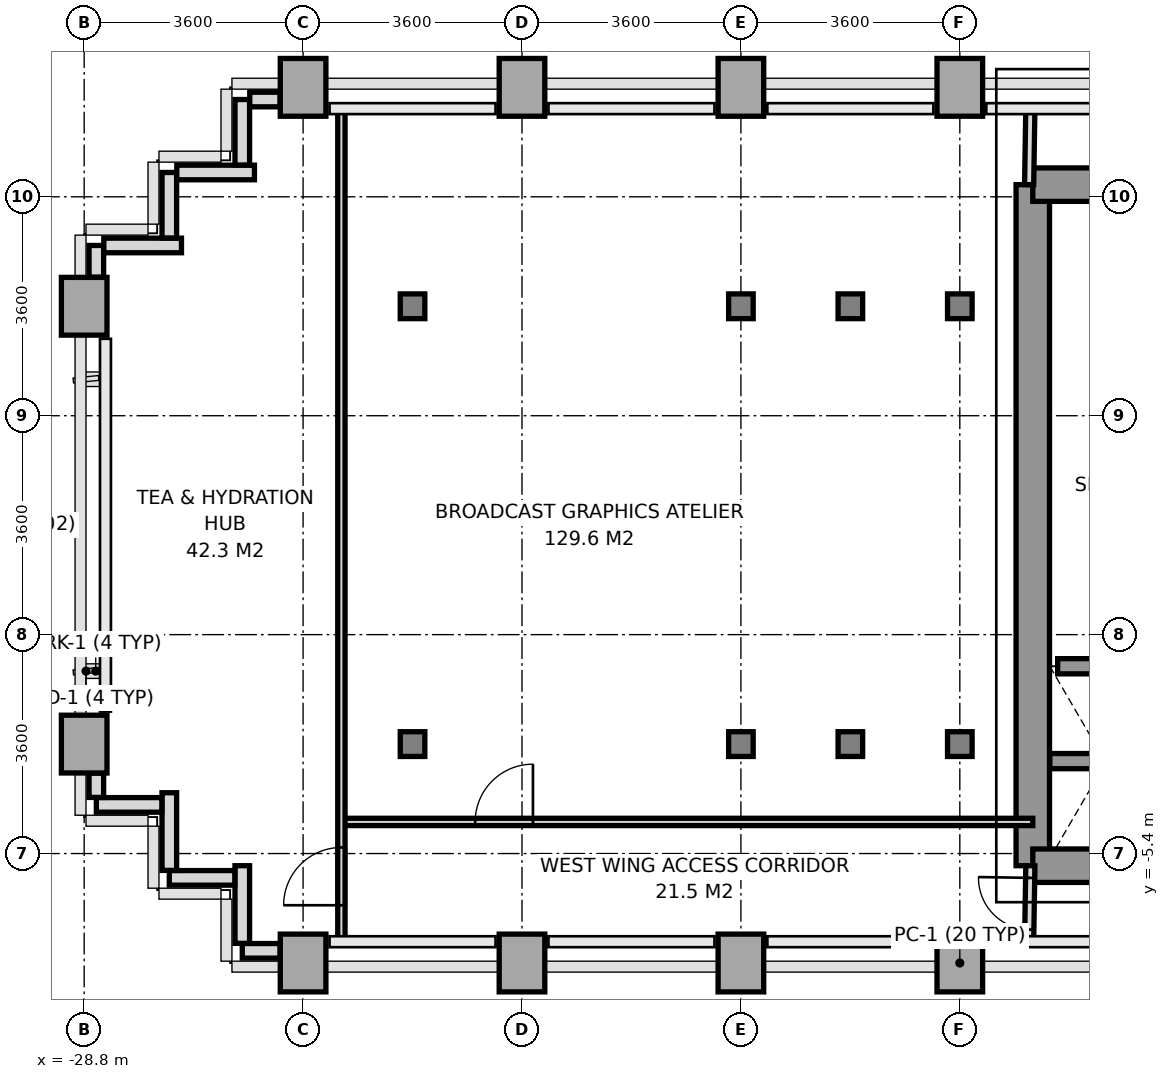
"""IFC4 building model, lengths in metres.
Left out: names, types, materials, properties, quantities, classifications, styles, units other than length and angle.
Written with IfcOpenShell. Run it as: python <this file> out.ifc"""

import sys

from ifc_helpers import new_model, si_unit, direction, frame, frame_2d, origin, origin_2d, place, context, subcontext, project, spatial, rectangle, i_section, extrude, source, transform, mapped, element, fill, save


model = new_model("IFC4")
c1 = context("Model", 3, precision=1e-05, world=origin(), true_north=direction((0.0, 1.0)))
c2 = subcontext(c1, "Body", "Model", "MODEL_VIEW")
j1 = project(units=[si_unit("LENGTHUNIT", "METRE"), si_unit("PLANEANGLEUNIT", "RADIAN")], contexts=[c1])
p1 = place(None, origin())
s1 = spatial("IfcSite", under=j1, at=p1, CompositionType="ELEMENT")
p2 = place(p1, origin())
s2 = spatial("IfcBuilding", under=s1, at=p2, CompositionType="ELEMENT")
p3 = place(p2, frame((0.0, 0.0, 57.8)))
s3 = spatial("IfcBuildingStorey", under=s2, at=p3, CompositionType="ELEMENT", Elevation=57.8)
m1 = source(origin(), c2, "Body", "SweptSolid", [
    extrude(rectangle(XDim=0.75, YDim=0.95, at=origin_2d()), origin(), (0.0, 0.0, 1.0), 3.2),
])
for number, where, z_axis, x_axis in (
    (1, (-28.8, -3.6, 0.0), (0.0, 0.0, 1.0), (1.0, 0.0, 0.0)),
    (2, (-28.8, 3.6, 0.0), (0.0, 0.0, 1.0), (1.0, 0.0, 0.0)),
    (3, (-25.2, -7.2, 0.0), (0.0, 0.0, 1.0), (1.0, 0.0, 0.0)),
    (4, (-25.2, 7.2, 0.0), (0.0, 0.0, 1.0), (1.0, 0.0, 0.0)),
):
    element("IfcColumn", number, at=place(p3, frame(where, z_axis=z_axis, x_axis=x_axis)), inside=s3, PredefinedType="COLUMN", context=c2, shape_type="MappedRepresentation", body=[
        mapped(m1, transform((0.0, 0.0, 0.0), x_axis=(1.0, 0.0, 0.0), y_axis=(0.0, 1.0, 0.0), z_axis=(0.0, 0.0, 1.0), scale=1.0)),
    ])
m2 = source(origin(), c2, "Body", "SweptSolid", [
    extrude(i_section(OverallWidth=0.404, OverallDepth=0.407, WebThickness=0.022, FlangeThickness=0.035, at=origin_2d()), origin(), (0.0, 0.0, 1.0), 3.2),
])
for number, where, z_axis, x_axis in (
    (5, (-23.4, -3.6, 0.0), (0.0, 0.0, 1.0), (1.0, 0.0, 0.0)),
    (6, (-23.4, 3.6, 0.0), (0.0, 0.0, 1.0), (1.0, 0.0, 0.0)),
):
    element("IfcColumn", number, at=place(p3, frame(where, z_axis=z_axis, x_axis=x_axis)), inside=s3, PredefinedType="COLUMN", context=c2, shape_type="MappedRepresentation", body=[
        mapped(m2, transform((0.0, 0.0, 0.0), x_axis=(1.0, 0.0, 0.0), y_axis=(0.0, 1.0, 0.0), z_axis=(0.0, 0.0, 1.0), scale=1.0)),
    ])
for number, where, z_axis, x_axis in (
    (7, (-21.6, -7.2, 0.0), (0.0, 0.0, 1.0), (1.0, 0.0, 0.0)),
    (8, (-21.6, 7.2, 0.0), (0.0, 0.0, 1.0), (1.0, 0.0, 0.0)),
    (9, (-18.0, -7.2, 0.0), (0.0, 0.0, 1.0), (1.0, 0.0, 0.0)),
):
    element("IfcColumn", number, at=place(p3, frame(where, z_axis=z_axis, x_axis=x_axis)), inside=s3, PredefinedType="COLUMN", context=c2, shape_type="MappedRepresentation", body=[
        mapped(m1, transform((0.0, 0.0, 0.0), x_axis=(1.0, 0.0, 0.0), y_axis=(0.0, 1.0, 0.0), z_axis=(0.0, 0.0, 1.0), scale=1.0)),
    ])
for number, where, z_axis, x_axis in (
    (10, (-18.0, -3.6, 0.0), (0.0, 0.0, 1.0), (1.0, 0.0, 0.0)),
    (11, (-18.0, 3.6, 0.0), (0.0, 0.0, 1.0), (1.0, 0.0, 0.0)),
):
    element("IfcColumn", number, at=place(p3, frame(where, z_axis=z_axis, x_axis=x_axis)), inside=s3, PredefinedType="COLUMN", context=c2, shape_type="MappedRepresentation", body=[
        mapped(m2, transform((0.0, 0.0, 0.0), x_axis=(1.0, 0.0, 0.0), y_axis=(0.0, 1.0, 0.0), z_axis=(0.0, 0.0, 1.0), scale=1.0)),
    ])
p4 = place(p3, frame((-18.0, 7.2, 0.0), z_axis=(0.0, 0.0, 1.0), x_axis=(1.0, 0.0, 0.0)))
e12 = element("IfcColumn", 12, at=p4, inside=s3, PredefinedType="COLUMN", context=c2, shape_type="MappedRepresentation", body=[
    mapped(m1, transform((0.0, 0.0, 0.0), x_axis=(1.0, 0.0, 0.0), y_axis=(0.0, 1.0, 0.0), z_axis=(0.0, 0.0, 1.0), scale=1.0)),
])
for number, where, z_axis, x_axis in (
    (13, (-16.2, -3.6, 0.0), (0.0, 0.0, 1.0), (1.0, 0.0, 0.0)),
    (14, (-16.2, 3.6, 0.0), (0.0, 0.0, 1.0), (1.0, 0.0, 0.0)),
):
    element("IfcColumn", number, at=place(p3, frame(where, z_axis=z_axis, x_axis=x_axis)), inside=s3, PredefinedType="COLUMN", context=c2, shape_type="MappedRepresentation", body=[
        mapped(m2, transform((0.0, 0.0, 0.0), x_axis=(1.0, 0.0, 0.0), y_axis=(0.0, 1.0, 0.0), z_axis=(0.0, 0.0, 1.0), scale=1.0)),
    ])
p5 = place(p3, frame((-14.4, -7.2, 0.0), z_axis=(0.0, 0.0, 1.0), x_axis=(1.0, 0.0, 0.0)))
e15 = element("IfcColumn", 15, at=p5, inside=s3, PredefinedType="COLUMN", context=c2, shape_type="MappedRepresentation", body=[
    mapped(m1, transform((0.0, 0.0, 0.0), x_axis=(1.0, 0.0, 0.0), y_axis=(0.0, 1.0, 0.0), z_axis=(0.0, 0.0, 1.0), scale=1.0)),
])
for number, where, z_axis, x_axis in (
    (16, (-14.4, -3.6, 0.0), (0.0, 0.0, 1.0), (1.0, 0.0, 0.0)),
    (17, (-14.4, 3.6, 0.0), (0.0, 0.0, 1.0), (1.0, 0.0, 0.0)),
):
    element("IfcColumn", number, at=place(p3, frame(where, z_axis=z_axis, x_axis=x_axis)), inside=s3, PredefinedType="COLUMN", context=c2, shape_type="MappedRepresentation", body=[
        mapped(m2, transform((0.0, 0.0, 0.0), x_axis=(1.0, 0.0, 0.0), y_axis=(0.0, 1.0, 0.0), z_axis=(0.0, 0.0, 1.0), scale=1.0)),
    ])
p6 = place(p3, frame((-14.4, 7.2, 0.0), z_axis=(0.0, 0.0, 1.0), x_axis=(1.0, 0.0, 0.0)))
e18 = element("IfcColumn", 18, at=p6, inside=s3, PredefinedType="COLUMN", context=c2, shape_type="MappedRepresentation", body=[
    mapped(m1, transform((0.0, 0.0, 0.0), x_axis=(1.0, 0.0, 0.0), y_axis=(0.0, 1.0, 0.0), z_axis=(0.0, 0.0, 1.0), scale=1.0)),
])
p7 = place(p3, frame((-25.578, -7.0, 0.0), z_axis=(0.0, 0.0, 1.0), x_axis=(-1.0, 0.0, 0.0)))
e19 = element("IfcWall", 19, at=p7, inside=s3, PredefinedType="PARAPET", context=c2, shape_type="SweptSolid", body=[
    extrude(rectangle(XDim=0.622, YDim=0.24, at=frame_2d((0.311, 0.0))), origin(), (0.0, 0.0, 1.0), 1.15),
])
p8 = place(p3, frame((-26.2, -6.877, 0.0), z_axis=(0.0, 0.0, 1.0), x_axis=(0.0, 1.0, 0.0)))
e20 = element("IfcWall", 20, at=p8, inside=s3, PredefinedType="PARAPET", context=c2, shape_type="SweptSolid", body=[
    extrude(rectangle(XDim=1.277, YDim=0.24, at=frame_2d((0.638, 0.0))), origin(), (0.0, 0.0, 1.0), 1.15),
])
p9 = place(p3, frame((-26.323, -5.8, 0.0), z_axis=(0.0, 0.0, 1.0), x_axis=(-1.0, 0.0, 0.0)))
e21 = element("IfcWall", 21, at=p9, inside=s3, PredefinedType="PARAPET", context=c2, shape_type="SweptSolid", body=[
    extrude(rectangle(XDim=1.077, YDim=0.24, at=frame_2d((0.539, 0.0))), origin(), (0.0, 0.0, 1.0), 1.15),
])
p10 = place(p3, frame((-27.4, -5.677, 0.0), z_axis=(0.0, 0.0, 1.0), x_axis=(0.0, 1.0, 0.0)))
e22 = element("IfcWall", 22, at=p10, inside=s3, PredefinedType="PARAPET", context=c2, shape_type="SweptSolid", body=[
    extrude(rectangle(XDim=1.277, YDim=0.24, at=frame_2d((0.639, 0.0))), origin(), (0.0, 0.0, 1.0), 1.15),
])
p11 = place(p3, frame((-27.523, -4.6, 0.0), z_axis=(0.0, 0.0, 1.0), x_axis=(-1.0, 0.0, 0.0)))
e23 = element("IfcWall", 23, at=p11, inside=s3, PredefinedType="PARAPET", context=c2, shape_type="SweptSolid", body=[
    extrude(rectangle(XDim=1.077, YDim=0.24, at=frame_2d((0.539, 0.0))), origin(), (0.0, 0.0, 1.0), 1.15),
])
p12 = place(p3, frame((-28.6, -4.477, 0.0), z_axis=(0.0, 0.0, 1.0), x_axis=(0.0, 1.0, 0.0)))
e24 = element("IfcWall", 24, at=p12, inside=s3, PredefinedType="PARAPET", context=c2, shape_type="SweptSolid", body=[
    extrude(rectangle(XDim=0.399, YDim=0.24, at=frame_2d((0.2, 0.0))), origin(), (0.0, 0.0, 1.0), 1.15),
])
p13 = place(p3, frame((-28.6, 4.078, 0.0), z_axis=(0.0, 0.0, 1.0), x_axis=(0.0, 1.0, 0.0)))
e25 = element("IfcWall", 25, at=p13, inside=s3, PredefinedType="PARAPET", context=c2, shape_type="SweptSolid", body=[
    extrude(rectangle(XDim=0.522, YDim=0.24, at=frame_2d((0.261, 0.0))), origin(), (0.0, 0.0, 1.0), 1.15),
])
p14 = place(p3, frame((-28.477, 4.6, 0.0), z_axis=(0.0, 0.0, 1.0), x_axis=(1.0, 0.0, 0.0)))
e26 = element("IfcWall", 26, at=p14, inside=s3, PredefinedType="PARAPET", context=c2, shape_type="SweptSolid", body=[
    extrude(rectangle(XDim=1.277, YDim=0.24, at=frame_2d((0.639, 0.0))), origin(), (0.0, 0.0, 1.0), 1.15),
])
p15 = place(p3, frame((-27.4, 4.723, 0.0), z_axis=(0.0, 0.0, 1.0), x_axis=(0.0, 1.0, 0.0)))
e27 = element("IfcWall", 27, at=p15, inside=s3, PredefinedType="PARAPET", context=c2, shape_type="SweptSolid", body=[
    extrude(rectangle(XDim=1.077, YDim=0.24, at=frame_2d((0.539, 0.0))), origin(), (0.0, 0.0, 1.0), 1.15),
])
p16 = place(p3, frame((-27.277, 5.8, 0.0), z_axis=(0.0, 0.0, 1.0), x_axis=(1.0, 0.0, 0.0)))
e28 = element("IfcWall", 28, at=p16, inside=s3, PredefinedType="PARAPET", context=c2, shape_type="SweptSolid", body=[
    extrude(rectangle(XDim=1.277, YDim=0.24, at=frame_2d((0.639, 0.0))), origin(), (0.0, 0.0, 1.0), 1.15),
])
p17 = place(p3, frame((-26.2, 5.923, 0.0), z_axis=(0.0, 0.0, 1.0), x_axis=(0.0, 1.0, 0.0)))
e29 = element("IfcWall", 29, at=p17, inside=s3, PredefinedType="PARAPET", context=c2, shape_type="SweptSolid", body=[
    extrude(rectangle(XDim=1.077, YDim=0.24, at=frame_2d((0.539, 0.0))), origin(), (0.0, 0.0, 1.0), 1.15),
])
p18 = place(p3, frame((-26.077, 7.0, 0.0), z_axis=(0.0, 0.0, 1.0), x_axis=(1.0, 0.0, 0.0)))
e30 = element("IfcWall", 30, at=p18, inside=s3, PredefinedType="PARAPET", context=c2, shape_type="SweptSolid", body=[
    extrude(rectangle(XDim=0.499, YDim=0.24, at=frame_2d((0.25, 0.0))), origin(), (0.0, 0.0, 1.0), 1.15),
])
p19 = place(p3, frame((-13.2, -5.6, 0.0), z_axis=(0.0, 0.0, 1.0), x_axis=(0.0, 1.0, 0.0)))
e31 = element("IfcWall", 31, at=p19, inside=s3, PredefinedType="SHEAR", context=c2, shape_type="SweptSolid", body=[
    extrude(rectangle(XDim=11.2, YDim=0.55, at=frame_2d((5.6, 0.0))), origin(), (0.0, 0.0, 1.0), 3.2),
])
p20 = place(p3, frame((-13.2, 5.6, 0.0), z_axis=(0.0, 0.0, 1.0), x_axis=(1.0, 0.0, 0.0)))
e32 = element("IfcWall", 32, at=p20, inside=s3, PredefinedType="SHEAR", context=c2, shape_type="SweptSolid", body=[
    extrude(rectangle(XDim=1.819, YDim=0.55, at=frame_2d((0.909, 0.0))), origin(), (0.0, 0.0, 1.0), 3.2),
])
p21 = place(p3, frame((-13.2, -5.6, 0.0), z_axis=(0.0, 0.0, 1.0), x_axis=(1.0, 0.0, 0.0)))
e33 = element("IfcWall", 33, at=p21, inside=s3, PredefinedType="SHEAR", context=c2, shape_type="SweptSolid", body=[
    extrude(rectangle(XDim=7.8, YDim=0.55, at=frame_2d((3.9, 0.0))), origin(), (0.0, 0.0, 1.0), 3.2),
])
p22 = place(p21, frame((3.6, 0.0, 0.0)))
e34 = element("IfcOpeningElement", 34, at=p22, cuts=e33, PredefinedType="OPENING", context=c2, shape_type="SweptSolid", body=[
    extrude(rectangle(XDim=1.2, YDim=2.2, at=frame_2d((0.6, 1.1))), frame((0.0, 0.285, 0.0), z_axis=(0.0, -1.0, 0.0), x_axis=(1.0, 0.0, 0.0)), (0.0, 0.0, 1.0), 0.57),
])
p23 = place(p3, frame((-12.92, -3.88, 0.0), z_axis=(0.0, 0.0, 1.0), x_axis=(1.0, 0.0, 0.0)))
e35 = element("IfcWall", 35, at=p23, inside=s3, PredefinedType="SOLIDWALL", context=c2, shape_type="SweptSolid", body=[
    extrude(rectangle(XDim=1.84, YDim=0.25, at=frame_2d((0.92, 0.0))), origin(), (0.0, 0.0, 1.0), 3.2),
])
p24 = place(p3, frame((-12.791, -2.32, 0.0), z_axis=(0.0, 0.0, 1.0), x_axis=(1.0, 0.0, 0.0)))
e36 = element("IfcWall", 36, at=p24, inside=s3, PredefinedType="SOLIDWALL", context=c2, shape_type="SweptSolid", body=[
    extrude(rectangle(XDim=1.582, YDim=0.25, at=frame_2d((0.791, 0.0))), origin(), (0.0, 0.0, 1.0), 3.2),
])
p25 = place(p3, frame((-13.26, 5.6, 0.0), z_axis=(0.0, 0.0, 1.0), x_axis=(0.016013571389, 0.999871774545, 0.0)))
e37 = element("IfcWall", 37, at=p25, inside=s3, PredefinedType="PARTITIONING", context=c2, shape_type="SweptSolid", body=[
    extrude(rectangle(XDim=1.25, YDim=0.15, at=frame_2d((0.625, 0.0))), origin(), (0.0, 0.0, 1.0), 3.2),
])
p26 = place(p3, frame((-13.26, -6.85, 0.0), z_axis=(0.0, 0.0, 1.0), x_axis=(0.016013571389, 0.999871774545, 0.0)))
e38 = element("IfcWall", 38, at=p26, inside=s3, PredefinedType="PARTITIONING", context=c2, shape_type="SweptSolid", body=[
    extrude(rectangle(XDim=1.25, YDim=0.15, at=frame_2d((0.625, 0.0))), origin(), (0.0, 0.0, 1.0), 3.2),
])
p27 = place(p26, frame((0.2, 0.0, 0.0)))
e39 = element("IfcOpeningElement", 39, at=p27, cuts=e38, PredefinedType="OPENING", context=c2, shape_type="SweptSolid", body=[
    extrude(rectangle(XDim=0.85, YDim=2.1, at=frame_2d((0.425, 1.05))), frame((0.0, 0.085, 0.0), z_axis=(0.0, -1.0, 0.0), x_axis=(1.0, 0.0, 0.0)), (0.0, 0.0, 1.0), 0.17),
])
p28 = place(p3, frame((-24.57, -4.88, 0.0), z_axis=(0.0, 0.0, 1.0), x_axis=(1.0, 0.0, 0.0)))
e40 = element("IfcWall", 40, at=p28, inside=s3, PredefinedType="PARTITIONING", context=c2, shape_type="SweptSolid", body=[
    extrude(rectangle(XDim=11.37, YDim=0.12, at=frame_2d((5.685, 0.0))), origin(), (0.0, 0.0, 1.0), 2.7),
])
p29 = place(p28, frame((2.2, 0.0, 0.0)))
e41 = element("IfcOpeningElement", 41, at=p29, cuts=e40, PredefinedType="OPENING", context=c2, shape_type="SweptSolid", body=[
    extrude(rectangle(XDim=0.95, YDim=2.15, at=frame_2d((0.475, 1.075))), frame((0.0, 0.07, 0.0), z_axis=(0.0, -1.0, 0.0), x_axis=(1.0, 0.0, 0.0)), (0.0, 0.0, 1.0), 0.14),
])
p30 = place(p3, frame((-24.57, -6.85, 0.0), z_axis=(0.0, 0.0, 1.0), x_axis=(0.0, 1.0, 0.0)))
e42 = element("IfcWall", 42, at=p30, inside=s3, PredefinedType="PARTITIONING", context=c2, shape_type="SweptSolid", body=[
    extrude(rectangle(XDim=13.7, YDim=0.12, at=frame_2d((6.85, 0.0))), origin(), (0.0, 0.0, 1.0), 2.65),
])
p31 = place(p30, frame((0.6, 0.0, 0.0)))
e43 = element("IfcOpeningElement", 43, at=p31, cuts=e42, PredefinedType="OPENING", context=c2, shape_type="SweptSolid", body=[
    extrude(rectangle(XDim=0.95, YDim=2.15, at=frame_2d((0.475, 1.075))), frame((0.0, 0.07, 0.0), z_axis=(0.0, -1.0, 0.0), x_axis=(1.0, 0.0, 0.0)), (0.0, 0.0, 1.0), 0.14),
])
m3 = source(origin(), c2, "Body", "SweptSolid", [
    extrude(rectangle(XDim=0.95, YDim=2.15, at=frame_2d((0.475, 1.075))), frame((0.0, 0.025, 0.0), z_axis=(0.0, -1.0, 0.0), x_axis=(1.0, 0.0, 0.0)), (0.0, 0.0, 1.0), 0.05),
])
p32 = place(p29, origin())
e44 = element("IfcDoor", 44, at=p32, inside=s3, OperationType="SINGLE_SWING_RIGHT", PredefinedType="DOOR", context=c2, shape_type="MappedRepresentation", body=[
    mapped(m3, transform((0.0, 0.0, 0.0), x_axis=(1.0, 0.0, 0.0), y_axis=(0.0, 1.0, 0.0), z_axis=(0.0, 0.0, 1.0), scale=1.0)),
])
fill(e41, e44)
p33 = place(p31, origin())
e45 = element("IfcDoor", 45, at=p33, inside=s3, OperationType="SINGLE_SWING_LEFT", PredefinedType="DOOR", context=c2, shape_type="MappedRepresentation", body=[
    mapped(m3, transform((0.0, 0.0, 0.0), x_axis=(1.0, 0.0, 0.0), y_axis=(0.0, 1.0, 0.0), z_axis=(0.0, 0.0, 1.0), scale=1.0)),
])
fill(e43, e45)
m4 = source(origin(), c2, "Body", "SweptSolid", [
    extrude(rectangle(XDim=0.85, YDim=2.1, at=frame_2d((0.425, 1.05))), frame((0.0, 0.025, 0.0), z_axis=(0.0, -1.0, 0.0), x_axis=(1.0, 0.0, 0.0)), (0.0, 0.0, 1.0), 0.05),
])
p34 = place(p27, origin())
e46 = element("IfcDoor", 46, at=p34, inside=s3, OperationType="SINGLE_SWING_RIGHT", PredefinedType="DOOR", context=c2, shape_type="MappedRepresentation", body=[
    mapped(m4, transform((0.0, 0.0, 0.0), x_axis=(1.0, 0.0, 0.0), y_axis=(0.0, 1.0, 0.0), z_axis=(0.0, 0.0, 1.0), scale=1.0)),
])
fill(e39, e46)
save(model, sys.argv[1])
